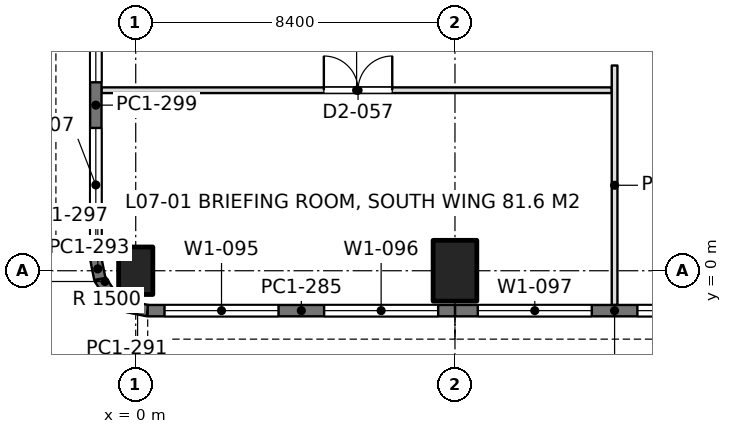
"""IFC4 building model, lengths in metres.
Left out: names, types, materials, properties, quantities, classifications, styles, units other than length and angle.
Written with IfcOpenShell. Run it as: python <this file> out.ifc"""

import sys

from ifc_helpers import new_model, si_unit, direction, frame, frame_2d, origin, origin_with_axes, origin_2d, place, context, subcontext, project, spatial, rectangle, extrude, element, fill, save


model = new_model("IFC4")
c1 = context("Model", 3, precision=1e-05, world=origin(), true_north=direction((0.0, 1.0)))
c2 = subcontext(c1, "Body", "Model", "MODEL_VIEW")
j1 = project(units=[si_unit("LENGTHUNIT", "METRE"), si_unit("PLANEANGLEUNIT", "RADIAN")], contexts=[c1])
p1 = place(None, origin())
s1 = spatial("IfcSite", under=j1, at=p1, CompositionType="ELEMENT")
p2 = place(p1, origin())
s2 = spatial("IfcBuilding", under=s1, at=p2, CompositionType="ELEMENT")
p3 = place(p2, frame((0.0, 0.0, 32.4)))
s3 = spatial("IfcBuildingStorey", under=s2, at=p3, CompositionType="ELEMENT", Elevation=32.4)
p4 = place(p3, origin_with_axes())
e1 = element("IfcColumn", 1, at=p4, inside=s3, PredefinedType="COLUMN", context=c2, shape_type="SweptSolid", body=[
    extrude(rectangle(XDim=0.9, YDim=1.25, at=origin_2d()), origin(), (0.0, 0.0, 1.0), 4.5),
])
p5 = place(p3, frame((8.4, 0.0, 0.0), z_axis=(0.0, 0.0, 1.0), x_axis=(1.0, 0.0, 0.0)))
e2 = element("IfcColumn", 2, at=p5, inside=s3, PredefinedType="COLUMN", context=c2, shape_type="SweptSolid", body=[
    extrude(rectangle(XDim=1.15, YDim=1.6, at=origin_2d()), origin(), (0.0, 0.0, 1.0), 4.5),
])
p6 = place(p3, frame((16.8, -1.05, 0.0), z_axis=(0.0, 0.0, 1.0), x_axis=(-1.0, 0.0, 0.0)))
e3 = element("IfcWall", 3, at=p6, inside=s3, PredefinedType="SOLIDWALL", context=c2, shape_type="SweptSolid", body=[
    extrude(rectangle(XDim=8.4, YDim=0.3, at=frame_2d((4.2, 0.0))), origin(), (0.0, 0.0, 1.0), 4.34),
])
p7 = place(p6, frame((0.6, 0.0, 0.9)))
e4 = element("IfcOpeningElement", 4, at=p7, cuts=e3, PredefinedType="OPENING", context=c2, shape_type="SweptSolid", body=[
    extrude(rectangle(XDim=3.0, YDim=1.9, at=frame_2d((1.5, 0.95))), frame((0.0, 0.16, 0.0), z_axis=(0.0, -1.0, 0.0), x_axis=(1.0, 0.0, 0.0)), (0.0, 0.0, 1.0), 0.32),
])
p8 = place(p6, frame((4.8, 0.0, 0.9)))
e5 = element("IfcOpeningElement", 5, at=p8, cuts=e3, PredefinedType="OPENING", context=c2, shape_type="SweptSolid", body=[
    extrude(rectangle(XDim=3.0, YDim=1.9, at=frame_2d((1.5, 0.95))), frame((0.0, 0.16, 0.0), z_axis=(0.0, -1.0, 0.0), x_axis=(1.0, 0.0, 0.0)), (0.0, 0.0, 1.0), 0.32),
])
p9 = place(p3, frame((8.4, -1.05, 0.0), z_axis=(0.0, 0.0, 1.0), x_axis=(-1.0, 0.0, 0.0)))
e6 = element("IfcWall", 6, at=p9, inside=s3, PredefinedType="SOLIDWALL", context=c2, shape_type="SweptSolid", body=[
    extrude(rectangle(XDim=8.085, YDim=0.3, at=frame_2d((4.042, 0.0))), origin(), (0.0, 0.0, 1.0), 4.34),
])
p10 = place(p9, frame((0.443, 0.0, 0.9)))
e7 = element("IfcOpeningElement", 7, at=p10, cuts=e6, PredefinedType="OPENING", context=c2, shape_type="SweptSolid", body=[
    extrude(rectangle(XDim=3.0, YDim=1.9, at=frame_2d((1.5, 0.95))), frame((0.0, 0.16, 0.0), z_axis=(0.0, -1.0, 0.0), x_axis=(1.0, 0.0, 0.0)), (0.0, 0.0, 1.0), 0.32),
])
p11 = place(p9, frame((4.643, 0.0, 0.9)))
e8 = element("IfcOpeningElement", 8, at=p11, cuts=e6, PredefinedType="OPENING", context=c2, shape_type="SweptSolid", body=[
    extrude(rectangle(XDim=3.0, YDim=1.9, at=frame_2d((1.5, 0.95))), frame((0.0, 0.16, 0.0), z_axis=(0.0, -1.0, 0.0), x_axis=(1.0, 0.0, 0.0)), (0.0, 0.0, 1.0), 0.32),
])
p12 = place(p3, frame((0.315, -1.05, 0.0), z_axis=(0.0, 0.0, 1.0), x_axis=(-0.980788534345, 0.195073962632, 0.0)))
e9 = element("IfcWall", 9, at=p12, inside=s3, PredefinedType="SOLIDWALL", context=c2, shape_type="SweptSolid", body=[
    extrude(rectangle(XDim=0.541, YDim=0.3, at=frame_2d((0.271, 0.0))), origin(), (0.0, 0.0, 1.0), 4.34),
])
for number, where, z_axis, x_axis in (
    (10, (-0.216, -0.945, 0.0), (0.0, 0.0, 1.0), (-0.831, 0.556, 0.0)),
    (11, (-0.653, -0.653, 0.0), (0.0, 0.0, 1.0), (-0.556, 0.831, 0.0)),
):
    element("IfcWall", number, at=place(p3, frame(where, z_axis=z_axis, x_axis=x_axis)), inside=s3, PredefinedType="SOLIDWALL", context=c2, shape_type="SweptSolid", body=[
        extrude(rectangle(XDim=0.526, YDim=0.3, at=frame_2d((0.263, 0.0))), origin(), (0.0, 0.0, 1.0), 4.34),
    ])
p13 = place(p3, frame((-0.945, -0.216, 0.0), z_axis=(0.0, 0.0, 1.0), x_axis=(-0.195073962632, 0.980788534345, 0.0)))
e12 = element("IfcWall", 12, at=p13, inside=s3, PredefinedType="SOLIDWALL", context=c2, shape_type="SweptSolid", body=[
    extrude(rectangle(XDim=0.541, YDim=0.3, at=frame_2d((0.271, 0.0))), origin(), (0.0, 0.0, 1.0), 4.34),
])
p14 = place(p3, frame((-1.05, 0.315, 0.0), z_axis=(0.0, 0.0, 1.0), x_axis=(0.0, 1.0, 0.0)))
e13 = element("IfcWall", 13, at=p14, inside=s3, PredefinedType="SOLIDWALL", context=c2, shape_type="SweptSolid", body=[
    extrude(rectangle(XDim=8.085, YDim=0.3, at=frame_2d((4.042, 0.0))), origin(), (0.0, 0.0, 1.0), 4.34),
])
p15 = place(p14, frame((0.443, 0.0, 0.9)))
e14 = element("IfcOpeningElement", 14, at=p15, cuts=e13, PredefinedType="OPENING", context=c2, shape_type="SweptSolid", body=[
    extrude(rectangle(XDim=3.0, YDim=1.9, at=frame_2d((1.5, 0.95))), frame((0.0, 0.16, 0.0), z_axis=(0.0, -1.0, 0.0), x_axis=(1.0, 0.0, 0.0)), (0.0, 0.0, 1.0), 0.32),
])
p16 = place(p14, frame((4.643, 0.0, 0.9)))
e15 = element("IfcOpeningElement", 15, at=p16, cuts=e13, PredefinedType="OPENING", context=c2, shape_type="SweptSolid", body=[
    extrude(rectangle(XDim=3.0, YDim=1.9, at=frame_2d((1.5, 0.95))), frame((0.0, 0.16, 0.0), z_axis=(0.0, -1.0, 0.0), x_axis=(1.0, 0.0, 0.0)), (0.0, 0.0, 1.0), 0.32),
])
p17 = place(p3, frame((-0.902, 4.75, 0.0), z_axis=(0.0, 0.0, 1.0), x_axis=(1.0, 0.0, 0.0)))
e16 = element("IfcWall", 16, at=p17, inside=s3, PredefinedType="PARTITIONING", context=c2, shape_type="SweptSolid", body=[
    extrude(rectangle(XDim=13.428, YDim=0.15, at=frame_2d((6.714, 0.0))), origin(), (0.0, 0.0, 1.0), 3.74),
])
p18 = place(p17, frame((5.852, 0.0, 0.0)))
e17 = element("IfcOpeningElement", 17, at=p18, cuts=e16, PredefinedType="OPENING", context=c2, shape_type="SweptSolid", body=[
    extrude(rectangle(XDim=1.8, YDim=2.2, at=frame_2d((0.9, 1.1))), frame((0.0, 0.085, 0.0), z_axis=(0.0, -1.0, 0.0), x_axis=(1.0, 0.0, 0.0)), (0.0, 0.0, 1.0), 0.17),
])
p19 = place(p3, frame((12.6, -0.902, 0.0), z_axis=(0.0, 0.0, 1.0), x_axis=(0.0, 1.0, 0.0)))
e18 = element("IfcWall", 18, at=p19, inside=s3, PredefinedType="PARTITIONING", context=c2, shape_type="SweptSolid", body=[
    extrude(rectangle(XDim=6.302, YDim=0.15, at=frame_2d((3.151, 0.0))), origin(), (0.0, 0.0, 1.0), 3.84),
])
p20 = place(p7, origin())
e19 = element("IfcWindow", 19, at=p20, inside=s3, PartitioningType="SINGLE_PANEL", PredefinedType="WINDOW", context=c2, shape_type="SweptSolid", body=[
    extrude(rectangle(XDim=3.0, YDim=1.9, at=frame_2d((1.5, 0.95))), frame((0.0, 0.03, 0.0), z_axis=(0.0, -1.0, 0.0), x_axis=(1.0, 0.0, 0.0)), (0.0, 0.0, 1.0), 0.06),
])
fill(e4, e19)
p21 = place(p8, origin())
e20 = element("IfcWindow", 20, at=p21, inside=s3, PartitioningType="SINGLE_PANEL", PredefinedType="WINDOW", context=c2, shape_type="SweptSolid", body=[
    extrude(rectangle(XDim=3.0, YDim=1.9, at=frame_2d((1.5, 0.95))), frame((0.0, 0.03, 0.0), z_axis=(0.0, -1.0, 0.0), x_axis=(1.0, 0.0, 0.0)), (0.0, 0.0, 1.0), 0.06),
])
fill(e5, e20)
p22 = place(p10, origin())
e21 = element("IfcWindow", 21, at=p22, inside=s3, PartitioningType="SINGLE_PANEL", PredefinedType="WINDOW", context=c2, shape_type="SweptSolid", body=[
    extrude(rectangle(XDim=3.0, YDim=1.9, at=frame_2d((1.5, 0.95))), frame((0.0, 0.03, 0.0), z_axis=(0.0, -1.0, 0.0), x_axis=(1.0, 0.0, 0.0)), (0.0, 0.0, 1.0), 0.06),
])
fill(e7, e21)
p23 = place(p11, origin())
e22 = element("IfcWindow", 22, at=p23, inside=s3, PartitioningType="SINGLE_PANEL", PredefinedType="WINDOW", context=c2, shape_type="SweptSolid", body=[
    extrude(rectangle(XDim=3.0, YDim=1.9, at=frame_2d((1.5, 0.95))), frame((0.0, 0.03, 0.0), z_axis=(0.0, -1.0, 0.0), x_axis=(1.0, 0.0, 0.0)), (0.0, 0.0, 1.0), 0.06),
])
fill(e8, e22)
p24 = place(p15, origin())
e23 = element("IfcWindow", 23, at=p24, inside=s3, PartitioningType="SINGLE_PANEL", PredefinedType="WINDOW", context=c2, shape_type="SweptSolid", body=[
    extrude(rectangle(XDim=3.0, YDim=1.9, at=frame_2d((1.5, 0.95))), frame((0.0, 0.03, 0.0), z_axis=(0.0, -1.0, 0.0), x_axis=(1.0, 0.0, 0.0)), (0.0, 0.0, 1.0), 0.06),
])
fill(e14, e23)
p25 = place(p16, origin())
e24 = element("IfcWindow", 24, at=p25, inside=s3, PartitioningType="SINGLE_PANEL", PredefinedType="WINDOW", context=c2, shape_type="SweptSolid", body=[
    extrude(rectangle(XDim=3.0, YDim=1.9, at=frame_2d((1.5, 0.95))), frame((0.0, 0.03, 0.0), z_axis=(0.0, -1.0, 0.0), x_axis=(1.0, 0.0, 0.0)), (0.0, 0.0, 1.0), 0.06),
])
fill(e15, e24)
p26 = place(p18, origin())
e25 = element("IfcDoor", 25, at=p26, inside=s3, OperationType="DOUBLE_DOOR_SINGLE_SWING", PredefinedType="DOOR", context=c2, shape_type="SweptSolid", body=[
    extrude(rectangle(XDim=1.8, YDim=2.2, at=frame_2d((0.9, 1.1))), frame((0.0, 0.025, 0.0), z_axis=(0.0, -1.0, 0.0), x_axis=(1.0, 0.0, 0.0)), (0.0, 0.0, 1.0), 0.05),
])
fill(e17, e25)
save(model, sys.argv[1])
